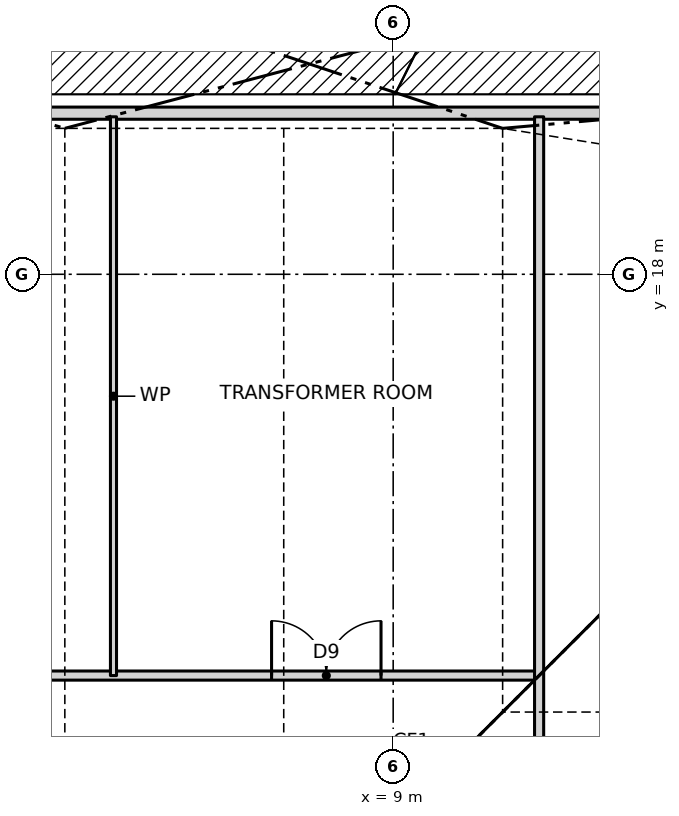
"""IFC4 building model, lengths in metres.
Left out: names, types, materials, properties, quantities, classifications, styles, units other than length and angle.
Written with IfcOpenShell. Run it as: python <this file> out.ifc"""

import sys

from ifc_helpers import new_model, si_unit, direction, frame, frame_2d, origin, origin_2d, place, context, subcontext, project, spatial, rectangle, hollow_rectangle, extrude, clip, halfspace, element, fill, save


model = new_model("IFC4")
c1 = context("Model", 3, precision=1e-05, world=origin(), true_north=direction((0.0, 1.0)))
c2 = subcontext(c1, "Body", "Model", "MODEL_VIEW")
j1 = project(units=[si_unit("LENGTHUNIT", "METRE"), si_unit("PLANEANGLEUNIT", "RADIAN")], contexts=[c1])
p1 = place(None, origin())
s1 = spatial("IfcSite", under=j1, at=p1, CompositionType="ELEMENT")
p2 = place(p1, origin())
s2 = spatial("IfcBuilding", under=s1, at=p2, CompositionType="ELEMENT")
p3 = place(p2, frame((0.0, 0.0, 74.5)))
s3 = spatial("IfcBuildingStorey", under=s2, at=p3, CompositionType="ELEMENT", Elevation=74.5)
p4 = place(p3, frame((12.15, 22.65, 0.0), z_axis=(-0.206127500627, -0.343583115532, 0.91622164142), x_axis=(0.857517554715, -0.514454704863, 0.0)))
e1 = element("IfcColumn", 1, at=p4, inside=s3, PredefinedType="COLUMN", context=c2, shape_type="Clipping", body=[
    clip(clip(extrude(hollow_rectangle(XDim=0.8, YDim=0.8, WallThickness=0.09, at=origin_2d()), origin(), (0.0, 0.0, 1.0), 6.549), halfspace(frame((0.0, 0.0, 0.0), z_axis=(0.0, -0.400671815572, -0.91622164142), x_axis=(0.857517554715, 0.471354534126, -0.206127500627)), False)), halfspace(frame((0.0, 2.404, 5.497), z_axis=(0.0, 0.400671815572, 0.91622164142), x_axis=(0.857517554715, 0.471354534126, -0.206127500627)), False)),
])
p5 = place(p3, frame((4.05, 22.65, 0.0), z_axis=(-0.070044605522, -0.350261033367, 0.934029422311), x_axis=(0.980584767795, -0.196095673508, 0.0)))
e2 = element("IfcColumn", 2, at=p5, inside=s3, PredefinedType="COLUMN", context=c2, shape_type="Clipping", body=[
    clip(clip(extrude(hollow_rectangle(XDim=0.8, YDim=0.8, WallThickness=0.09, at=origin_2d()), origin(), (0.0, 0.0, 1.0), 6.424), halfspace(frame((0.0, 0.0, 0.0), z_axis=(0.0, -0.357196078167, -0.934029422311), x_axis=(0.980584767795, 0.183159128644, -0.070044605522)), False)), halfspace(frame((0.0, 2.143, 5.604), z_axis=(0.0, 0.357196078167, 0.934029422311), x_axis=(0.980584767795, 0.183159128644, -0.070044605522)), False)),
])
p6 = place(p3, frame((17.795, 20.65, 0.0), z_axis=(0.0, 0.0, 1.0), x_axis=(-1.0, 0.0, 0.0)))
e3 = element("IfcWall", 3, at=p6, inside=s3, PredefinedType="PARTITIONING", context=c2, shape_type="SweptSolid", body=[
    extrude(rectangle(XDim=35.59, YDim=0.2, at=frame_2d((17.795, 0.0))), origin(), (0.0, 0.0, 1.0), 5.7),
])
p7 = place(p3, frame((-20.59, 11.4, 0.0), z_axis=(0.0, 0.0, 1.0), x_axis=(1.0, 0.0, 0.0)))
e4 = element("IfcWall", 4, at=p7, inside=s3, PredefinedType="PARTITIONING", context=c2, shape_type="SweptSolid", body=[
    extrude(rectangle(XDim=31.99, YDim=0.15, at=frame_2d((15.995, 0.0))), origin(), (0.0, 0.0, 1.0), 5.77),
])
p8 = place(p7, frame((27.59, 0.0, 0.0)))
e5 = element("IfcOpeningElement", 5, at=p8, cuts=e4, PredefinedType="OPENING", context=c2, shape_type="SweptSolid", body=[
    extrude(rectangle(XDim=1.8, YDim=2.1, at=frame_2d((0.9, 1.05))), frame((0.0, 0.085, 0.0), z_axis=(0.0, -1.0, 0.0), x_axis=(1.0, 0.0, 0.0)), (0.0, 0.0, 1.0), 0.17),
])
p9 = place(p7, frame((20.09, 0.0, 0.0)))
e6 = element("IfcOpeningElement", 6, at=p9, cuts=e4, PredefinedType="OPENING", context=c2, shape_type="SweptSolid", body=[
    extrude(rectangle(XDim=1.8, YDim=2.1, at=frame_2d((0.9, 1.05))), frame((0.0, 0.085, 0.0), z_axis=(0.0, -1.0, 0.0), x_axis=(1.0, 0.0, 0.0)), (0.0, 0.0, 1.0), 0.17),
])
p10 = place(p7, frame((12.19, 0.0, 0.0)))
e7 = element("IfcOpeningElement", 7, at=p10, cuts=e4, PredefinedType="OPENING", context=c2, shape_type="SweptSolid", body=[
    extrude(rectangle(XDim=1.8, YDim=2.1, at=frame_2d((0.9, 1.05))), frame((0.0, 0.085, 0.0), z_axis=(0.0, -1.0, 0.0), x_axis=(1.0, 0.0, 0.0)), (0.0, 0.0, 1.0), 0.17),
])
p11 = place(p3, frame((11.4, -11.4, 0.0), z_axis=(0.0, 0.0, 1.0), x_axis=(0.0, 1.0, 0.0)))
e8 = element("IfcWall", 8, at=p11, inside=s3, PredefinedType="PARTITIONING", context=c2, shape_type="SweptSolid", body=[
    extrude(rectangle(XDim=31.99, YDim=0.15, at=frame_2d((15.995, 0.0))), origin(), (0.0, 0.0, 1.0), 5.77),
])
p12 = place(p11, frame((10.5, 0.0, 0.0)))
e9 = element("IfcOpeningElement", 9, at=p12, cuts=e8, PredefinedType="OPENING", context=c2, shape_type="SweptSolid", body=[
    extrude(rectangle(XDim=1.8, YDim=2.1, at=frame_2d((0.9, 1.05))), frame((0.0, 0.085, 0.0), z_axis=(0.0, -1.0, 0.0), x_axis=(1.0, 0.0, 0.0)), (0.0, 0.0, 1.0), 0.17),
])
p13 = place(p3, frame((4.4, 11.4, 0.0), z_axis=(0.0, 0.0, 1.0), x_axis=(0.0, 1.0, 0.0)))
e10 = element("IfcWall", 10, at=p13, inside=s3, PredefinedType="PARTITIONING", context=c2, shape_type="SweptSolid", body=[
    extrude(rectangle(XDim=9.19, YDim=0.1, at=frame_2d((4.595, 0.0))), origin(), (0.0, 0.0, 1.0), 5.77),
])
p14 = place(p8, origin())
e11 = element("IfcDoor", 11, at=p14, inside=s3, OperationType="DOUBLE_DOOR_SINGLE_SWING", PredefinedType="DOOR", context=c2, shape_type="SweptSolid", body=[
    extrude(rectangle(XDim=1.8, YDim=2.1, at=frame_2d((0.9, 1.05))), frame((0.0, 0.025, 0.0), z_axis=(0.0, -1.0, 0.0), x_axis=(1.0, 0.0, 0.0)), (0.0, 0.0, 1.0), 0.05),
])
fill(e5, e11)
save(model, sys.argv[1])
